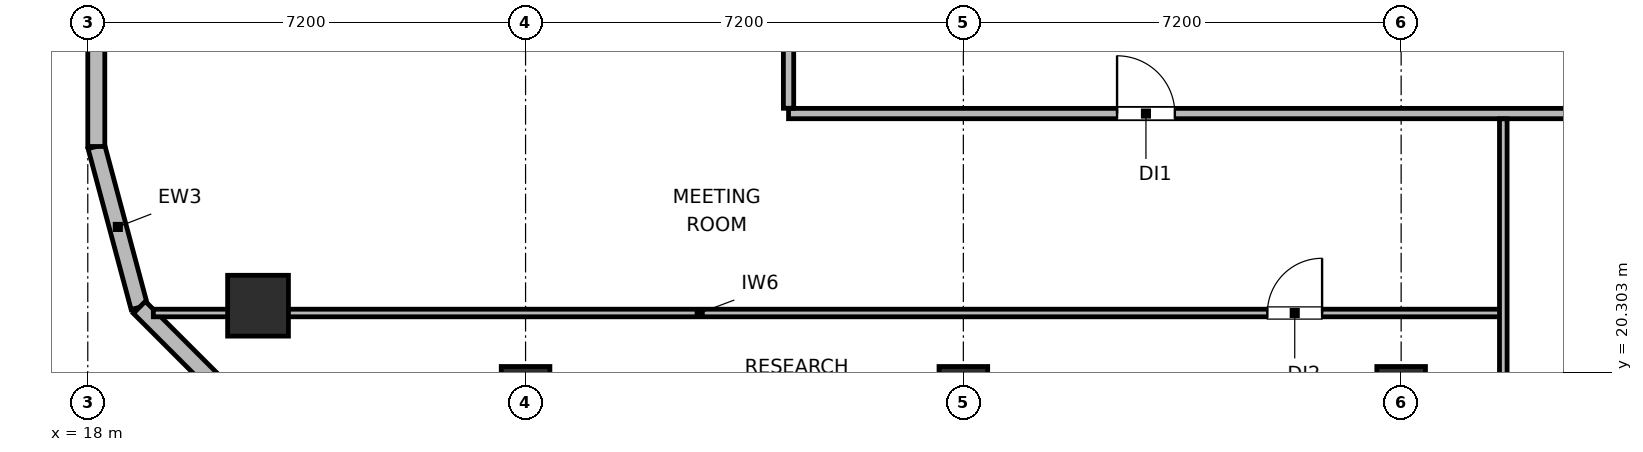
"""IFC4 building model, lengths in metres.
Left out: names, types, materials, properties, quantities, classifications, styles, units other than length and angle.
Written with IfcOpenShell. Run it as: python <this file> out.ifc"""

import sys

from ifc_helpers import new_model, si_unit, direction, frame, frame_2d, origin, origin_2d, place, context, subcontext, project, spatial, rectangle, circle, extrude, element, fill, save


model = new_model("IFC4")
c1 = context("Model", 3, precision=1e-05, world=origin(), true_north=direction((0.0, 1.0)))
c2 = subcontext(c1, "Body", "Model", "MODEL_VIEW")
j1 = project(units=[si_unit("LENGTHUNIT", "METRE"), si_unit("PLANEANGLEUNIT", "RADIAN")], contexts=[c1])
p1 = place(None, origin())
s1 = spatial("IfcSite", under=j1, at=p1, CompositionType="ELEMENT")
p2 = place(p1, origin())
s2 = spatial("IfcBuilding", under=s1, at=p2, CompositionType="ELEMENT")
p3 = place(p2, frame((0.0, 0.0, 177.9)))
s3 = spatial("IfcBuildingStorey", under=s2, at=p3, CompositionType="ELEMENT", Elevation=177.9)
p4 = place(p3, frame((20.8, 21.4, 0.0), z_axis=(0.0, 0.0, 1.0), x_axis=(1.0, 0.0, 0.0)))
e1 = element("IfcColumn", 1, at=p4, inside=s3, PredefinedType="COLUMN", context=c2, shape_type="SweptSolid", body=[
    extrude(circle(Radius=0.5, at=origin_2d()), origin(), (0.0, 0.0, 1.0), 3.9),
])
for number, where, z_axis, x_axis in (
    (2, (25.2, 19.8, 0.0), (0.0, 0.0, 1.0), (1.0, 0.0, 0.0)),
    (3, (32.4, 19.8, 0.0), (0.0, 0.0, 1.0), (1.0, 0.0, 0.0)),
    (4, (39.6, 19.8, 0.0), (0.0, 0.0, 1.0), (1.0, 0.0, 0.0)),
):
    element("IfcColumn", number, at=place(p3, frame(where, z_axis=z_axis, x_axis=x_axis)), inside=s3, PredefinedType="COLUMN", context=c2, shape_type="SweptSolid", body=[
        extrude(rectangle(XDim=0.8, YDim=1.2, at=origin_2d()), origin(), (0.0, 0.0, 1.0), 3.9),
    ])
p5 = place(p3, frame((18.848, 21.373, 0.0), z_axis=(0.0, 0.0, 1.0), x_axis=(-0.258672222976, 0.9659651552, 0.0)))
e5 = element("IfcWall", 5, at=p5, inside=s3, PredefinedType="SOLIDWALL", context=c2, shape_type="SweptSolid", body=[
    extrude(rectangle(XDim=2.739, YDim=0.28, at=frame_2d((1.37, 0.0))), origin(), (0.0, 0.0, 1.0), 3.68),
])
p6 = place(p3, frame((18.14, 24.018, 0.0), z_axis=(0.0, 0.0, 1.0), x_axis=(0.0, 1.0, 0.0)))
e6 = element("IfcWall", 6, at=p6, inside=s3, PredefinedType="SOLIDWALL", context=c2, shape_type="SweptSolid", body=[
    extrude(rectangle(XDim=5.242, YDim=0.28, at=frame_2d((2.621, 0.0))), origin(), (0.0, 0.0, 1.0), 3.68),
])
p7 = place(p3, frame((20.772, 19.448, 0.0), z_axis=(0.0, 0.0, 1.0), x_axis=(-0.707106781187, 0.707106781187, 0.0)))
e7 = element("IfcWall", 7, at=p7, inside=s3, PredefinedType="SOLIDWALL", context=c2, shape_type="SweptSolid", body=[
    extrude(rectangle(XDim=2.721, YDim=0.28, at=frame_2d((1.36, 0.0))), origin(), (0.0, 0.0, 1.0), 3.68),
])
p8 = place(p3, frame((29.525, 24.56, 0.0), z_axis=(0.0, 0.0, 1.0), x_axis=(1.0, 0.0, 0.0)))
e8 = element("IfcWall", 8, at=p8, inside=s3, PredefinedType="PARTITIONING", context=c2, shape_type="SweptSolid", body=[
    extrude(rectangle(XDim=34.075, YDim=0.17, at=frame_2d((17.038, 0.0))), origin(), (0.0, 0.0, 1.0), 3.68),
])
p9 = place(p8, frame((5.403, 0.0, 0.0)))
e9 = element("IfcOpeningElement", 9, at=p9, cuts=e8, PredefinedType="OPENING", context=c2, shape_type="SweptSolid", body=[
    extrude(rectangle(XDim=0.95, YDim=2.04, at=frame_2d((0.475, 1.02))), frame((0.0, 0.095, 0.0), z_axis=(0.0, -1.0, 0.0), x_axis=(1.0, 0.0, 0.0)), (0.0, 0.0, 1.0), 0.19),
])
p10 = place(p8, frame((16.56, 0.0, 0.0)))
e10 = element("IfcOpeningElement", 10, at=p10, cuts=e8, PredefinedType="OPENING", context=c2, shape_type="SweptSolid", body=[
    extrude(rectangle(XDim=0.95, YDim=2.04, at=frame_2d((0.475, 1.02))), frame((0.0, 0.095, 0.0), z_axis=(0.0, -1.0, 0.0), x_axis=(1.0, 0.0, 0.0)), (0.0, 0.0, 1.0), 0.19),
])
p11 = place(p8, frame((27.72, 0.0, 0.0)))
e11 = element("IfcOpeningElement", 11, at=p11, cuts=e8, PredefinedType="OPENING", context=c2, shape_type="SweptSolid", body=[
    extrude(rectangle(XDim=0.95, YDim=2.04, at=frame_2d((0.475, 1.02))), frame((0.0, 0.095, 0.0), z_axis=(0.0, -1.0, 0.0), x_axis=(1.0, 0.0, 0.0)), (0.0, 0.0, 1.0), 0.19),
])
p12 = place(p3, frame((29.525, 24.647, 0.0), z_axis=(0.0, 0.0, 1.0), x_axis=(0.0, 1.0, 0.0)))
e12 = element("IfcWall", 12, at=p12, inside=s3, PredefinedType="PARTITIONING", context=c2, shape_type="SweptSolid", body=[
    extrude(rectangle(XDim=9.753, YDim=0.17, at=frame_2d((4.876, 0.0))), origin(), (0.0, 0.0, 1.0), 3.68),
])
p13 = place(p12, frame((4.358, 0.0, 0.0)))
e13 = element("IfcOpeningElement", 13, at=p13, cuts=e12, PredefinedType="OPENING", context=c2, shape_type="SweptSolid", body=[
    extrude(rectangle(XDim=0.95, YDim=2.04, at=frame_2d((0.475, 1.02))), frame((0.0, 0.095, 0.0), z_axis=(0.0, -1.0, 0.0), x_axis=(1.0, 0.0, 0.0)), (0.0, 0.0, 1.0), 0.19),
])
p14 = place(p3, frame((19.078, 21.28, 0.0), z_axis=(0.0, 0.0, 1.0), x_axis=(1.0, 0.0, 0.0)))
e14 = element("IfcWall", 14, at=p14, inside=s3, PredefinedType="PARTITIONING", context=c2, shape_type="SweptSolid", body=[
    extrude(rectangle(XDim=22.202, YDim=0.125, at=frame_2d((11.101, 0.0))), origin(), (0.0, 0.0, 1.0), 2.265),
])
p15 = place(p14, frame((18.322, 0.0, 0.0)))
e15 = element("IfcOpeningElement", 15, at=p15, cuts=e14, PredefinedType="OPENING", context=c2, shape_type="SweptSolid", body=[
    extrude(rectangle(XDim=0.9, YDim=2.02, at=frame_2d((0.45, 1.01))), frame((0.0, 0.073, 0.0), z_axis=(0.0, -1.0, 0.0), x_axis=(1.0, 0.0, 0.0)), (0.0, 0.0, 1.0), 0.145),
])
p16 = place(p3, frame((41.28, 18.875, 0.0), z_axis=(0.0, 0.0, 1.0), x_axis=(0.0, 1.0, 0.0)))
e16 = element("IfcWall", 16, at=p16, inside=s3, PredefinedType="PARTITIONING", context=c2, shape_type="SweptSolid", body=[
    extrude(rectangle(XDim=5.598, YDim=0.125, at=frame_2d((2.799, 0.0))), origin(), (0.0, 0.0, 1.0), 3.043),
])
p17 = place(p15, origin())
e17 = element("IfcDoor", 17, at=p17, inside=s3, OperationType="SINGLE_SWING_RIGHT", PredefinedType="DOOR", context=c2, shape_type="SweptSolid", body=[
    extrude(rectangle(XDim=0.9, YDim=2.02, at=frame_2d((0.45, 1.01))), frame((0.0, 0.025, 0.0), z_axis=(0.0, -1.0, 0.0), x_axis=(1.0, 0.0, 0.0)), (0.0, 0.0, 1.0), 0.05),
])
fill(e15, e17)
p18 = place(p9, origin())
e18 = element("IfcDoor", 18, at=p18, inside=s3, OperationType="SINGLE_SWING_LEFT", PredefinedType="DOOR", context=c2, shape_type="SweptSolid", body=[
    extrude(rectangle(XDim=0.95, YDim=2.04, at=frame_2d((0.475, 1.02))), frame((0.0, 0.025, 0.0), z_axis=(0.0, -1.0, 0.0), x_axis=(1.0, 0.0, 0.0)), (0.0, 0.0, 1.0), 0.05),
])
fill(e9, e18)
save(model, sys.argv[1])
